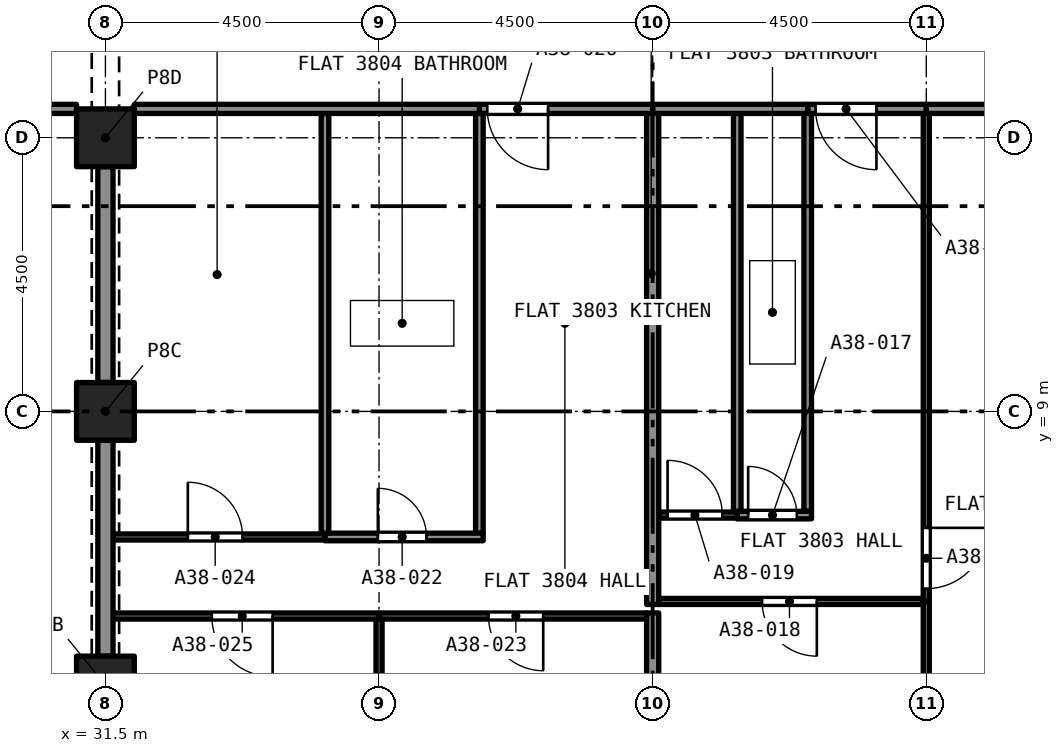
"""IFC4 building model, lengths in metres.
Left out: names, types, materials, properties, quantities, classifications, styles, units other than length and angle.
Written with IfcOpenShell. Run it as: python <this file> out.ifc"""

import sys

from ifc_helpers import new_model, si_unit, direction, frame, frame_2d, origin, origin_2d, place, context, subcontext, project, spatial, rectangle, extrude, element, fill, save


model = new_model("IFC4")
c1 = context("Model", 3, precision=1e-05, world=origin(), true_north=direction((0.0, 1.0)))
c2 = subcontext(c1, "Body", "Model", "MODEL_VIEW")
j1 = project(units=[si_unit("LENGTHUNIT", "METRE"), si_unit("PLANEANGLEUNIT", "RADIAN")], contexts=[c1])
p1 = place(None, origin())
s1 = spatial("IfcSite", under=j1, at=p1, CompositionType="ELEMENT")
p2 = place(p1, origin())
s2 = spatial("IfcBuilding", under=s1, at=p2, CompositionType="ELEMENT")
p3 = place(p2, frame((0.0, 0.0, 136.6)))
s3 = spatial("IfcBuildingStorey", under=s2, at=p3, CompositionType="ELEMENT", Elevation=136.6)
for number, where, z_axis, x_axis in (
    (1, (31.5, 4.5, 0.0), (0.0, 0.0, 1.0), (1.0, 0.0, 0.0)),
    (2, (31.5, 9.0, 0.0), (0.0, 0.0, 1.0), (1.0, 0.0, 0.0)),
    (3, (31.5, 13.5, 0.0), (0.0, 0.0, 1.0), (1.0, 0.0, 0.0)),
):
    element("IfcColumn", number, at=place(p3, frame(where, z_axis=z_axis, x_axis=x_axis)), inside=s3, PredefinedType="COLUMN", context=c2, shape_type="SweptSolid", body=[
        extrude(rectangle(XDim=0.95, YDim=0.95, at=origin_2d()), origin(), (0.0, 0.0, 1.0), 3.2),
    ])
p4 = place(p3, frame((43.05, 7.357, 0.0), z_axis=(0.0, 0.0, 1.0), x_axis=(0.0, 1.0, 0.0)))
e4 = element("IfcWall", 4, at=p4, inside=s3, PredefinedType="PARTITIONING", context=c2, shape_type="SweptSolid", body=[
    extrude(rectangle(XDim=6.542, YDim=0.125, at=frame_2d((3.271, 0.0))), origin(), (0.0, 0.0, 1.0), 2.9),
])
p5 = place(p3, frame((41.891, 7.295, 0.0), z_axis=(0.0, 0.0, 1.0), x_axis=(1.0, 0.0, 0.0)))
e5 = element("IfcWall", 5, at=p5, inside=s3, PredefinedType="PARTITIONING", context=c2, shape_type="SweptSolid", body=[
    extrude(rectangle(XDim=1.222, YDim=0.125, at=frame_2d((0.611, 0.0))), origin(), (0.0, 0.0, 1.0), 2.9),
])
p6 = place(p5, frame((0.179, 0.0, 0.0)))
e6 = element("IfcOpeningElement", 6, at=p6, cuts=e5, PredefinedType="OPENING", context=c2, shape_type="SweptSolid", body=[
    extrude(rectangle(XDim=0.8, YDim=2.1, at=frame_2d((0.4, 1.05))), frame((0.0, 0.073, 0.0), z_axis=(0.0, -1.0, 0.0), x_axis=(1.0, 0.0, 0.0)), (0.0, 0.0, 1.0), 0.145),
])
p7 = place(p3, frame((41.891, 7.357, 0.0), z_axis=(0.0, 0.0, 1.0), x_axis=(0.0, 1.0, 0.0)))
e7 = element("IfcWall", 7, at=p7, inside=s3, PredefinedType="PARTITIONING", context=c2, shape_type="SweptSolid", body=[
    extrude(rectangle(XDim=6.542, YDim=0.125, at=frame_2d((3.271, 0.0))), origin(), (0.0, 0.0, 1.0), 2.9),
])
p8 = place(p3, frame((44.95, 5.875, 0.0), z_axis=(0.0, 0.0, 1.0), x_axis=(-1.0, 0.0, 0.0)))
e8 = element("IfcWall", 8, at=p8, inside=s3, PredefinedType="PARTITIONING", context=c2, shape_type="SweptSolid", body=[
    extrude(rectangle(XDim=4.35, YDim=0.1, at=frame_2d((2.175, 0.0))), origin(), (0.0, 0.0, 1.0), 2.9),
])
p9 = place(p8, frame((1.75, 0.0, 0.0)))
e9 = element("IfcOpeningElement", 9, at=p9, cuts=e8, PredefinedType="OPENING", context=c2, shape_type="SweptSolid", body=[
    extrude(rectangle(XDim=0.9, YDim=2.1, at=frame_2d((0.45, 1.05))), frame((0.0, 0.06, 0.0), z_axis=(0.0, -1.0, 0.0), x_axis=(1.0, 0.0, 0.0)), (0.0, 0.0, 1.0), 0.12),
])
p10 = place(p3, frame((45.0, 0.514, 0.0), z_axis=(0.0, 0.0, 1.0), x_axis=(0.0, 1.0, 0.0)))
e10 = element("IfcWall", 10, at=p10, inside=s3, PredefinedType="PARTITIONING", context=c2, shape_type="SweptSolid", body=[
    extrude(rectangle(XDim=5.361, YDim=0.1, at=frame_2d((2.68, 0.0))), origin(), (0.0, 0.0, 1.0), 2.9),
])
p11 = place(p3, frame((40.5, 0.475, 0.0), z_axis=(0.0, 0.0, 1.0), x_axis=(0.0, 1.0, 0.0)))
e11 = element("IfcWall", 11, at=p11, inside=s3, PredefinedType="PARTITIONING", context=c2, shape_type="SweptSolid", body=[
    extrude(rectangle(XDim=5.21, YDim=0.2, at=frame_2d((2.605, 0.0))), origin(), (0.0, 0.0, 1.0), 2.9),
])
p12 = place(p3, frame((40.6, 7.295, 0.0), z_axis=(0.0, 0.0, 1.0), x_axis=(1.0, 0.0, 0.0)))
e12 = element("IfcWall", 12, at=p12, inside=s3, PredefinedType="PARTITIONING", context=c2, shape_type="SweptSolid", body=[
    extrude(rectangle(XDim=1.291, YDim=0.1, at=frame_2d((0.646, 0.0))), origin(), (0.0, 0.0, 1.0), 2.9),
])
p13 = place(p12, frame((0.146, 0.0, 0.0)))
e13 = element("IfcOpeningElement", 13, at=p13, cuts=e12, PredefinedType="OPENING", context=c2, shape_type="SweptSolid", body=[
    extrude(rectangle(XDim=0.9, YDim=2.1, at=frame_2d((0.45, 1.05))), frame((0.0, 0.06, 0.0), z_axis=(0.0, -1.0, 0.0), x_axis=(1.0, 0.0, 0.0)), (0.0, 0.0, 1.0), 0.12),
])
p14 = place(p3, frame((45.0, 13.9, 0.0), z_axis=(0.0, 0.0, 1.0), x_axis=(0.0, -1.0, 0.0)))
e14 = element("IfcWall", 14, at=p14, inside=s3, PredefinedType="PARTITIONING", context=c2, shape_type="SweptSolid", body=[
    extrude(rectangle(XDim=8.025, YDim=0.1, at=frame_2d((4.012, 0.0))), origin(), (0.0, 0.0, 1.0), 2.9),
])
p15 = place(p14, frame((6.815, 0.0, 0.0)))
e15 = element("IfcOpeningElement", 15, at=p15, cuts=e14, PredefinedType="OPENING", context=c2, shape_type="SweptSolid", body=[
    extrude(rectangle(XDim=1.0, YDim=2.1, at=frame_2d((0.5, 1.05))), frame((0.0, 0.06, 0.0), z_axis=(0.0, -1.0, 0.0), x_axis=(1.0, 0.0, 0.0)), (0.0, 0.0, 1.0), 0.12),
])
p16 = place(p3, frame((40.5, 5.825, 0.0), z_axis=(0.0, 0.0, 1.0), x_axis=(0.0, 1.0, 0.0)))
e16 = element("IfcWall", 16, at=p16, inside=s3, PredefinedType="PARTITIONING", context=c2, shape_type="SweptSolid", body=[
    extrude(rectangle(XDim=8.075, YDim=0.2, at=frame_2d((4.038, 0.0))), origin(), (0.0, 0.0, 1.0), 2.9),
])
p17 = place(p3, frame((45.0, 13.975, 0.0), z_axis=(0.0, 0.0, 1.0), x_axis=(-1.0, 0.0, 0.0)))
e17 = element("IfcWall", 17, at=p17, inside=s3, PredefinedType="PARTITIONING", context=c2, shape_type="SweptSolid", body=[
    extrude(rectangle(XDim=1.95, YDim=0.15, at=frame_2d((0.975, 0.0))), origin(), (0.0, 0.0, 1.0), 2.9),
])
p18 = place(p17, frame((0.82, 0.0, 0.0)))
e18 = element("IfcOpeningElement", 18, at=p18, cuts=e17, PredefinedType="OPENING", context=c2, shape_type="SweptSolid", body=[
    extrude(rectangle(XDim=1.0, YDim=2.1, at=frame_2d((0.5, 1.05))), frame((0.0, 0.085, 0.0), z_axis=(0.0, -1.0, 0.0), x_axis=(1.0, 0.0, 0.0)), (0.0, 0.0, 1.0), 0.17),
])
p19 = place(p3, frame((40.5, 13.975, 0.0), z_axis=(0.0, 0.0, 1.0), x_axis=(1.0, 0.0, 0.0)))
e19 = element("IfcWall", 19, at=p19, inside=s3, PredefinedType="PARTITIONING", context=c2, shape_type="SweptSolid", body=[
    extrude(rectangle(XDim=2.55, YDim=0.15, at=frame_2d((1.275, 0.0))), origin(), (0.0, 0.0, 1.0), 2.9),
])
p20 = place(p3, frame((45.0, 13.975, 0.0), z_axis=(0.0, 0.0, 1.0), x_axis=(1.0, 0.0, 0.0)))
e20 = element("IfcWall", 20, at=p20, inside=s3, PredefinedType="PARTITIONING", context=c2, shape_type="SweptSolid", body=[
    extrude(rectangle(XDim=4.025, YDim=0.15, at=frame_2d((2.012, 0.0))), origin(), (0.0, 0.0, 1.0), 2.9),
])
p21 = place(p3, frame((37.65, 6.998, 0.0), z_axis=(0.0, 0.0, 1.0), x_axis=(0.0, 1.0, 0.0)))
e21 = element("IfcWall", 21, at=p21, inside=s3, PredefinedType="PARTITIONING", context=c2, shape_type="SweptSolid", body=[
    extrude(rectangle(XDim=6.902, YDim=0.125, at=frame_2d((3.451, 0.0))), origin(), (0.0, 0.0, 1.0), 2.9),
])
p22 = place(p3, frame((35.111, 6.935, 0.0), z_axis=(0.0, 0.0, 1.0), x_axis=(1.0, 0.0, 0.0)))
e22 = element("IfcWall", 22, at=p22, inside=s3, PredefinedType="PARTITIONING", context=c2, shape_type="SweptSolid", body=[
    extrude(rectangle(XDim=2.602, YDim=0.125, at=frame_2d((1.301, 0.0))), origin(), (0.0, 0.0, 1.0), 2.9),
])
p23 = place(p22, frame((0.87, 0.0, 0.0)))
e23 = element("IfcOpeningElement", 23, at=p23, cuts=e22, PredefinedType="OPENING", context=c2, shape_type="SweptSolid", body=[
    extrude(rectangle(XDim=0.8, YDim=2.1, at=frame_2d((0.4, 1.05))), frame((0.0, 0.073, 0.0), z_axis=(0.0, -1.0, 0.0), x_axis=(1.0, 0.0, 0.0)), (0.0, 0.0, 1.0), 0.145),
])
p24 = place(p3, frame((35.111, 6.998, 0.0), z_axis=(0.0, 0.0, 1.0), x_axis=(0.0, 1.0, 0.0)))
e24 = element("IfcWall", 24, at=p24, inside=s3, PredefinedType="PARTITIONING", context=c2, shape_type="SweptSolid", body=[
    extrude(rectangle(XDim=6.902, YDim=0.125, at=frame_2d((3.451, 0.0))), origin(), (0.0, 0.0, 1.0), 2.9),
])
p25 = place(p3, frame((40.4, 5.635, 0.0), z_axis=(0.0, 0.0, 1.0), x_axis=(-1.0, 0.0, 0.0)))
e25 = element("IfcWall", 25, at=p25, inside=s3, PredefinedType="PARTITIONING", context=c2, shape_type="SweptSolid", body=[
    extrude(rectangle(XDim=4.4, YDim=0.1, at=frame_2d((2.2, 0.0))), origin(), (0.0, 0.0, 1.0), 2.9),
])
p26 = place(p25, frame((1.7, 0.0, 0.0)))
e26 = element("IfcOpeningElement", 26, at=p26, cuts=e25, PredefinedType="OPENING", context=c2, shape_type="SweptSolid", body=[
    extrude(rectangle(XDim=0.9, YDim=2.1, at=frame_2d((0.45, 1.05))), frame((0.0, 0.06, 0.0), z_axis=(0.0, -1.0, 0.0), x_axis=(1.0, 0.0, 0.0)), (0.0, 0.0, 1.0), 0.12),
])
p27 = place(p3, frame((36.0, 0.475, 0.0), z_axis=(0.0, 0.0, 1.0), x_axis=(0.0, 1.0, 0.0)))
e27 = element("IfcWall", 27, at=p27, inside=s3, PredefinedType="PARTITIONING", context=c2, shape_type="SweptSolid", body=[
    extrude(rectangle(XDim=5.11, YDim=0.1, at=frame_2d((2.555, 0.0))), origin(), (0.0, 0.0, 1.0), 2.9),
])
p28 = place(p3, frame((31.625, 6.935, 0.0), z_axis=(0.0, 0.0, 1.0), x_axis=(1.0, 0.0, 0.0)))
e28 = element("IfcWall", 28, at=p28, inside=s3, PredefinedType="PARTITIONING", context=c2, shape_type="SweptSolid", body=[
    extrude(rectangle(XDim=3.486, YDim=0.1, at=frame_2d((1.743, 0.0))), origin(), (0.0, 0.0, 1.0), 2.9),
])
p29 = place(p28, frame((1.23, 0.0, 0.0)))
e29 = element("IfcOpeningElement", 29, at=p29, cuts=e28, PredefinedType="OPENING", context=c2, shape_type="SweptSolid", body=[
    extrude(rectangle(XDim=0.9, YDim=2.1, at=frame_2d((0.45, 1.05))), frame((0.0, 0.06, 0.0), z_axis=(0.0, -1.0, 0.0), x_axis=(1.0, 0.0, 0.0)), (0.0, 0.0, 1.0), 0.12),
])
p30 = place(p3, frame((36.0, 5.635, 0.0), z_axis=(0.0, 0.0, 1.0), x_axis=(-1.0, 0.0, 0.0)))
e30 = element("IfcWall", 30, at=p30, inside=s3, PredefinedType="PARTITIONING", context=c2, shape_type="SweptSolid", body=[
    extrude(rectangle(XDim=4.375, YDim=0.1, at=frame_2d((2.188, 0.0))), origin(), (0.0, 0.0, 1.0), 2.9),
])
p31 = place(p30, frame((1.75, 0.0, 0.0)))
e31 = element("IfcOpeningElement", 31, at=p31, cuts=e30, PredefinedType="OPENING", context=c2, shape_type="SweptSolid", body=[
    extrude(rectangle(XDim=1.0, YDim=2.1, at=frame_2d((0.5, 1.05))), frame((0.0, 0.06, 0.0), z_axis=(0.0, -1.0, 0.0), x_axis=(1.0, 0.0, 0.0)), (0.0, 0.0, 1.0), 0.12),
])
p32 = place(p3, frame((40.5, 13.975, 0.0), z_axis=(0.0, 0.0, 1.0), x_axis=(-1.0, 0.0, 0.0)))
e32 = element("IfcWall", 32, at=p32, inside=s3, PredefinedType="PARTITIONING", context=c2, shape_type="SweptSolid", body=[
    extrude(rectangle(XDim=2.85, YDim=0.15, at=frame_2d((1.425, 0.0))), origin(), (0.0, 0.0, 1.0), 2.9),
])
p33 = place(p32, frame((1.72, 0.0, 0.0)))
e33 = element("IfcOpeningElement", 33, at=p33, cuts=e32, PredefinedType="OPENING", context=c2, shape_type="SweptSolid", body=[
    extrude(rectangle(XDim=1.0, YDim=2.1, at=frame_2d((0.5, 1.05))), frame((0.0, 0.085, 0.0), z_axis=(0.0, -1.0, 0.0), x_axis=(1.0, 0.0, 0.0)), (0.0, 0.0, 1.0), 0.17),
])
p34 = place(p3, frame((31.5, 9.475, 0.0), z_axis=(0.0, 0.0, 1.0), x_axis=(0.0, 1.0, 0.0)))
e34 = element("IfcWall", 34, at=p34, inside=s3, PredefinedType="PARTITIONING", context=c2, shape_type="SweptSolid", body=[
    extrude(rectangle(XDim=3.55, YDim=0.25, at=frame_2d((1.775, 0.0))), origin(), (0.0, 0.0, 1.0), 2.38),
])
p35 = place(p3, frame((31.975, 13.975, 0.0), z_axis=(0.0, 0.0, 1.0), x_axis=(1.0, 0.0, 0.0)))
e35 = element("IfcWall", 35, at=p35, inside=s3, PredefinedType="PARTITIONING", context=c2, shape_type="SweptSolid", body=[
    extrude(rectangle(XDim=5.675, YDim=0.15, at=frame_2d((2.837, 0.0))), origin(), (0.0, 0.0, 1.0), 2.9),
])
p36 = place(p3, frame((31.5, 4.975, 0.0), z_axis=(0.0, 0.0, 1.0), x_axis=(0.0, 1.0, 0.0)))
e36 = element("IfcWall", 36, at=p36, inside=s3, PredefinedType="PARTITIONING", context=c2, shape_type="SweptSolid", body=[
    extrude(rectangle(XDim=3.55, YDim=0.25, at=frame_2d((1.775, 0.0))), origin(), (0.0, 0.0, 1.0), 2.38),
])
p37 = place(p3, frame((31.025, 13.975, 0.0), z_axis=(0.0, 0.0, 1.0), x_axis=(-1.0, 0.0, 0.0)))
e37 = element("IfcWall", 37, at=p37, inside=s3, PredefinedType="PARTITIONING", context=c2, shape_type="SweptSolid", body=[
    extrude(rectangle(XDim=8.525, YDim=0.15, at=frame_2d((4.262, 0.0))), origin(), (0.0, 0.0, 1.0), 2.75),
])
p38 = place(p37, frame((3.525, 0.0, 0.0)))
e38 = element("IfcOpeningElement", 38, at=p38, cuts=e37, PredefinedType="OPENING", context=c2, shape_type="SweptSolid", body=[
    extrude(rectangle(XDim=1.0, YDim=2.1, at=frame_2d((0.5, 1.05))), frame((0.0, 0.085, 0.0), z_axis=(0.0, -1.0, 0.0), x_axis=(1.0, 0.0, 0.0)), (0.0, 0.0, 1.0), 0.17),
])
p39 = place(p6, origin())
e39 = element("IfcDoor", 39, at=p39, inside=s3, OperationType="SINGLE_SWING_LEFT", PredefinedType="DOOR", context=c2, shape_type="SweptSolid", body=[
    extrude(rectangle(XDim=0.8, YDim=2.1, at=frame_2d((0.4, 1.05))), frame((0.0, 0.025, 0.0), z_axis=(0.0, -1.0, 0.0), x_axis=(1.0, 0.0, 0.0)), (0.0, 0.0, 1.0), 0.05),
])
fill(e6, e39)
p40 = place(p9, origin())
e40 = element("IfcDoor", 40, at=p40, inside=s3, OperationType="SINGLE_SWING_RIGHT", PredefinedType="DOOR", context=c2, shape_type="SweptSolid", body=[
    extrude(rectangle(XDim=0.9, YDim=2.1, at=frame_2d((0.45, 1.05))), frame((0.0, 0.025, 0.0), z_axis=(0.0, -1.0, 0.0), x_axis=(1.0, 0.0, 0.0)), (0.0, 0.0, 1.0), 0.05),
])
fill(e9, e40)
p41 = place(p13, origin())
e41 = element("IfcDoor", 41, at=p41, inside=s3, OperationType="SINGLE_SWING_LEFT", PredefinedType="DOOR", context=c2, shape_type="SweptSolid", body=[
    extrude(rectangle(XDim=0.9, YDim=2.1, at=frame_2d((0.45, 1.05))), frame((0.0, 0.025, 0.0), z_axis=(0.0, -1.0, 0.0), x_axis=(1.0, 0.0, 0.0)), (0.0, 0.0, 1.0), 0.05),
])
fill(e13, e41)
p42 = place(p15, origin())
e42 = element("IfcDoor", 42, at=p42, inside=s3, OperationType="SINGLE_SWING_RIGHT", PredefinedType="DOOR", context=c2, shape_type="SweptSolid", body=[
    extrude(rectangle(XDim=1.0, YDim=2.1, at=frame_2d((0.5, 1.05))), frame((0.0, 0.025, 0.0), z_axis=(0.0, -1.0, 0.0), x_axis=(1.0, 0.0, 0.0)), (0.0, 0.0, 1.0), 0.05),
])
fill(e15, e42)
p43 = place(p18, origin())
e43 = element("IfcDoor", 43, at=p43, inside=s3, OperationType="SINGLE_SWING_RIGHT", PredefinedType="DOOR", context=c2, shape_type="SweptSolid", body=[
    extrude(rectangle(XDim=1.0, YDim=2.1, at=frame_2d((0.5, 1.05))), frame((0.0, 0.025, 0.0), z_axis=(0.0, -1.0, 0.0), x_axis=(1.0, 0.0, 0.0)), (0.0, 0.0, 1.0), 0.05),
])
fill(e18, e43)
p44 = place(p23, origin())
e44 = element("IfcDoor", 44, at=p44, inside=s3, OperationType="SINGLE_SWING_LEFT", PredefinedType="DOOR", context=c2, shape_type="SweptSolid", body=[
    extrude(rectangle(XDim=0.8, YDim=2.1, at=frame_2d((0.4, 1.05))), frame((0.0, 0.025, 0.0), z_axis=(0.0, -1.0, 0.0), x_axis=(1.0, 0.0, 0.0)), (0.0, 0.0, 1.0), 0.05),
])
fill(e23, e44)
p45 = place(p26, origin())
e45 = element("IfcDoor", 45, at=p45, inside=s3, OperationType="SINGLE_SWING_LEFT", PredefinedType="DOOR", context=c2, shape_type="SweptSolid", body=[
    extrude(rectangle(XDim=0.9, YDim=2.1, at=frame_2d((0.45, 1.05))), frame((0.0, 0.025, 0.0), z_axis=(0.0, -1.0, 0.0), x_axis=(1.0, 0.0, 0.0)), (0.0, 0.0, 1.0), 0.05),
])
fill(e26, e45)
p46 = place(p29, origin())
e46 = element("IfcDoor", 46, at=p46, inside=s3, OperationType="SINGLE_SWING_LEFT", PredefinedType="DOOR", context=c2, shape_type="SweptSolid", body=[
    extrude(rectangle(XDim=0.9, YDim=2.1, at=frame_2d((0.45, 1.05))), frame((0.0, 0.025, 0.0), z_axis=(0.0, -1.0, 0.0), x_axis=(1.0, 0.0, 0.0)), (0.0, 0.0, 1.0), 0.05),
])
fill(e29, e46)
p47 = place(p31, origin())
e47 = element("IfcDoor", 47, at=p47, inside=s3, OperationType="SINGLE_SWING_RIGHT", PredefinedType="DOOR", context=c2, shape_type="SweptSolid", body=[
    extrude(rectangle(XDim=1.0, YDim=2.1, at=frame_2d((0.5, 1.05))), frame((0.0, 0.025, 0.0), z_axis=(0.0, -1.0, 0.0), x_axis=(1.0, 0.0, 0.0)), (0.0, 0.0, 1.0), 0.05),
])
fill(e31, e47)
p48 = place(p33, origin())
e48 = element("IfcDoor", 48, at=p48, inside=s3, OperationType="SINGLE_SWING_RIGHT", PredefinedType="DOOR", context=c2, shape_type="SweptSolid", body=[
    extrude(rectangle(XDim=1.0, YDim=2.1, at=frame_2d((0.5, 1.05))), frame((0.0, 0.025, 0.0), z_axis=(0.0, -1.0, 0.0), x_axis=(1.0, 0.0, 0.0)), (0.0, 0.0, 1.0), 0.05),
])
fill(e33, e48)
save(model, sys.argv[1])
